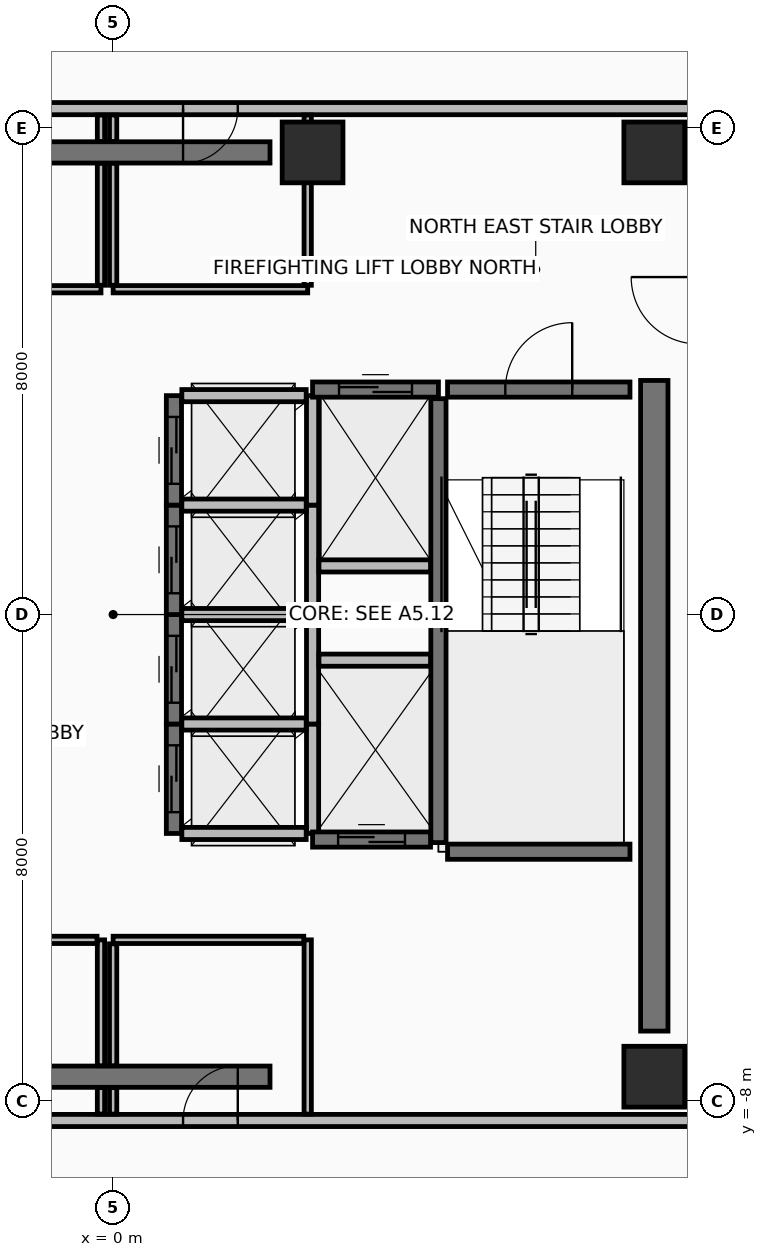
"""IFC4 building model, lengths in metres.
Left out: names, types, materials, properties, quantities, classifications, styles, units other than length and angle.
Written with IfcOpenShell. Run it as: python <this file> out.ifc"""

import sys

from ifc_helpers import new_model, si_unit, direction, frame, frame_2d, origin, origin_2d, place, context, subcontext, project, spatial, rectangle, extrude, element, fill, save


model = new_model("IFC4")
c1 = context("Model", 3, precision=1e-05, world=origin(), true_north=direction((0.0, 1.0)))
c2 = subcontext(c1, "Body", "Model", "MODEL_VIEW")
j1 = project(units=[si_unit("LENGTHUNIT", "METRE"), si_unit("PLANEANGLEUNIT", "RADIAN")], contexts=[c1])
p1 = place(None, origin())
s1 = spatial("IfcSite", under=j1, at=p1, CompositionType="ELEMENT")
p2 = place(p1, origin())
s2 = spatial("IfcBuilding", under=s1, at=p2, CompositionType="ELEMENT")
p3 = place(p2, frame((0.0, 0.0, 271.4)))
s3 = spatial("IfcBuildingStorey", under=s2, at=p3, CompositionType="ELEMENT", Elevation=271.4)
for number, where, z_axis, x_axis in (
    (1, (8.9, -7.6, 0.0), (0.0, 0.0, 1.0), (1.0, 0.0, 0.0)),
    (2, (8.9, 7.6, 0.0), (0.0, 0.0, 1.0), (1.0, 0.0, 0.0)),
    (3, (3.28, 7.6, 0.0), (0.0, 0.0, 1.0), (1.0, 0.0, 0.0)),
):
    element("IfcColumn", number, at=place(p3, frame(where, z_axis=z_axis, x_axis=x_axis)), inside=s3, PredefinedType="COLUMN", context=c2, shape_type="SweptSolid", body=[
        extrude(rectangle(XDim=1.0, YDim=1.0, at=origin_2d()), origin(), (0.0, 0.0, 1.0), 3.6),
    ])
for number, where, z_axis, x_axis in (
    (4, (-2.8, -7.6, 0.0), (0.0, 0.0, 1.0), (1.0, 0.0, 0.0)),
    (5, (-2.8, 7.6, 0.0), (0.0, 0.0, 1.0), (1.0, 0.0, 0.0)),
):
    element("IfcWall", number, at=place(p3, frame(where, z_axis=z_axis, x_axis=x_axis)), inside=s3, PredefinedType="SHEAR", context=c2, shape_type="SweptSolid", body=[
        extrude(rectangle(XDim=5.38, YDim=0.35, at=frame_2d((2.69, 0.0))), origin(), (0.0, 0.0, 1.0), 3.42),
    ])
p4 = place(p3, frame((8.9, -6.85, 0.0), z_axis=(0.0, 0.0, 1.0), x_axis=(0.0, 1.0, 0.0)))
e6 = element("IfcWall", 6, at=p4, inside=s3, PredefinedType="SHEAR", context=c2, shape_type="SweptSolid", body=[
    extrude(rectangle(XDim=10.7, YDim=0.45, at=frame_2d((5.35, 0.0))), origin(), (0.0, 0.0, 1.0), 3.42),
])
p5 = place(p3, frame((-9.62, -8.32, 0.0), z_axis=(0.0, 0.0, 1.0), x_axis=(1.0, 0.0, 0.0)))
e7 = element("IfcWall", 7, at=p5, inside=s3, PredefinedType="PARTITIONING", context=c2, shape_type="SweptSolid", body=[
    extrude(rectangle(XDim=19.24, YDim=0.2, at=frame_2d((9.62, 0.0))), origin(), (0.0, 0.0, 1.0), 2.915),
])
p6 = place(p5, frame((7.37, 0.0, 0.0)))
e8 = element("IfcOpeningElement", 8, at=p6, cuts=e7, PredefinedType="OPENING", context=c2, shape_type="SweptSolid", body=[
    extrude(rectangle(XDim=0.9, YDim=2.1, at=frame_2d((0.45, 1.05))), frame((0.0, 0.11, 0.0), z_axis=(0.0, -1.0, 0.0), x_axis=(1.0, 0.0, 0.0)), (0.0, 0.0, 1.0), 0.22),
])
p7 = place(p5, frame((10.77, 0.0, 0.0)))
e9 = element("IfcOpeningElement", 9, at=p7, cuts=e7, PredefinedType="OPENING", context=c2, shape_type="SweptSolid", body=[
    extrude(rectangle(XDim=0.9, YDim=2.1, at=frame_2d((0.45, 1.05))), frame((0.0, 0.11, 0.0), z_axis=(0.0, -1.0, 0.0), x_axis=(1.0, 0.0, 0.0)), (0.0, 0.0, 1.0), 0.22),
])
p8 = place(p3, frame((9.62, 8.32, 0.0), z_axis=(0.0, 0.0, 1.0), x_axis=(-1.0, 0.0, 0.0)))
e10 = element("IfcWall", 10, at=p8, inside=s3, PredefinedType="PARTITIONING", context=c2, shape_type="SweptSolid", body=[
    extrude(rectangle(XDim=19.24, YDim=0.2, at=frame_2d((9.62, 0.0))), origin(), (0.0, 0.0, 1.0), 2.915),
])
p9 = place(p8, frame((10.97, 0.0, 0.0)))
e11 = element("IfcOpeningElement", 11, at=p9, cuts=e10, PredefinedType="OPENING", context=c2, shape_type="SweptSolid", body=[
    extrude(rectangle(XDim=0.9, YDim=2.1, at=frame_2d((0.45, 1.05))), frame((0.0, 0.11, 0.0), z_axis=(0.0, -1.0, 0.0), x_axis=(1.0, 0.0, 0.0)), (0.0, 0.0, 1.0), 0.22),
])
p10 = place(p8, frame((7.57, 0.0, 0.0)))
e12 = element("IfcOpeningElement", 12, at=p10, cuts=e10, PredefinedType="OPENING", context=c2, shape_type="SweptSolid", body=[
    extrude(rectangle(XDim=0.9, YDim=2.1, at=frame_2d((0.45, 1.05))), frame((0.0, 0.11, 0.0), z_axis=(0.0, -1.0, 0.0), x_axis=(1.0, 0.0, 0.0)), (0.0, 0.0, 1.0), 0.22),
])
p11 = place(p8, frame((15.02, 0.0, 0.0)))
e13 = element("IfcOpeningElement", 13, at=p11, cuts=e10, PredefinedType="OPENING", context=c2, shape_type="SweptSolid", body=[
    extrude(rectangle(XDim=0.9, YDim=2.1, at=frame_2d((0.45, 1.05))), frame((0.0, 0.11, 0.0), z_axis=(0.0, -1.0, 0.0), x_axis=(1.0, 0.0, 0.0)), (0.0, 0.0, 1.0), 0.22),
])
p12 = place(p3, frame((5.35, -3.75, 0.0), z_axis=(0.0, 0.0, 1.0), x_axis=(0.0, 1.0, 0.0)))
e14 = element("IfcWall", 14, at=p12, inside=s3, PredefinedType="SHEAR", context=c2, shape_type="SweptSolid", body=[
    extrude(rectangle(XDim=7.3, YDim=0.25, at=frame_2d((3.65, 0.0))), origin(), (0.0, 0.0, 1.0), 3.42),
])
p13 = place(p3, frame((5.5, 3.7, 0.0), z_axis=(0.0, 0.0, 1.0), x_axis=(1.0, 0.0, 0.0)))
e15 = element("IfcWall", 15, at=p13, inside=s3, PredefinedType="SHEAR", context=c2, shape_type="SweptSolid", body=[
    extrude(rectangle(XDim=3.0, YDim=0.25, at=frame_2d((1.5, 0.0))), origin(), (0.0, 0.0, 1.0), 3.42),
])
p14 = place(p13, frame((0.95, 0.0, 0.0)))
e16 = element("IfcOpeningElement", 16, at=p14, cuts=e15, PredefinedType="OPENING", context=c2, shape_type="SweptSolid", body=[
    extrude(rectangle(XDim=1.1, YDim=2.15, at=frame_2d((0.55, 1.075))), frame((0.0, 0.135, 0.0), z_axis=(0.0, -1.0, 0.0), x_axis=(1.0, 0.0, 0.0)), (0.0, 0.0, 1.0), 0.27),
])
p15 = place(p3, frame((5.5, -3.9, 0.0), z_axis=(0.0, 0.0, 1.0), x_axis=(1.0, 0.0, 0.0)))
e17 = element("IfcWall", 17, at=p15, inside=s3, PredefinedType="SHEAR", context=c2, shape_type="SweptSolid", body=[
    extrude(rectangle(XDim=3.0, YDim=0.25, at=frame_2d((1.5, 0.0))), origin(), (0.0, 0.0, 1.0), 3.42),
])
p16 = place(p3, frame((1.0, -3.6, 0.0), z_axis=(0.0, 0.0, 1.0), x_axis=(0.0, 1.0, 0.0)))
e18 = element("IfcWall", 18, at=p16, inside=s3, PredefinedType="SHEAR", context=c2, shape_type="SweptSolid", body=[
    extrude(rectangle(XDim=1.8, YDim=0.25, at=frame_2d((0.9, 0.0))), origin(), (0.0, 0.0, 1.0), 3.42),
])
p17 = place(p16, frame((0.35, 0.0, 0.0)))
e19 = element("IfcOpeningElement", 19, at=p17, cuts=e18, PredefinedType="OPENING", context=c2, shape_type="SweptSolid", body=[
    extrude(rectangle(XDim=1.1, YDim=2.2, at=frame_2d((0.55, 1.1))), frame((0.0, 0.135, 0.0), z_axis=(0.0, -1.0, 0.0), x_axis=(1.0, 0.0, 0.0)), (0.0, 0.0, 1.0), 0.27),
])
p18 = place(p3, frame((3.28, -3.6, 0.0), z_axis=(0.0, 0.0, 1.0), x_axis=(0.0, 1.0, 0.0)))
e20 = element("IfcWall", 20, at=p18, inside=s3, PredefinedType="PARTITIONING", context=c2, shape_type="SweptSolid", body=[
    extrude(rectangle(XDim=1.8, YDim=0.2, at=frame_2d((0.9, 0.0))), origin(), (0.0, 0.0, 1.0), 3.42),
])
for number, where, z_axis, x_axis in (
    (21, (1.13, -3.6, 0.0), (0.0, 0.0, 1.0), (1.0, 0.0, 0.0)),
    (22, (1.13, -1.8, 0.0), (0.0, 0.0, 1.0), (1.0, 0.0, 0.0)),
):
    element("IfcWall", number, at=place(p3, frame(where, z_axis=z_axis, x_axis=x_axis)), inside=s3, PredefinedType="PARTITIONING", context=c2, shape_type="SweptSolid", body=[
        extrude(rectangle(XDim=2.045, YDim=0.2, at=frame_2d((1.022, 0.0))), origin(), (0.0, 0.0, 1.0), 3.42),
    ])
p19 = place(p3, frame((1.0, -1.8, 0.0), z_axis=(0.0, 0.0, 1.0), x_axis=(0.0, 1.0, 0.0)))
e23 = element("IfcWall", 23, at=p19, inside=s3, PredefinedType="SHEAR", context=c2, shape_type="SweptSolid", body=[
    extrude(rectangle(XDim=1.8, YDim=0.25, at=frame_2d((0.9, 0.0))), origin(), (0.0, 0.0, 1.0), 3.42),
])
p20 = place(p19, frame((0.35, 0.0, 0.0)))
e24 = element("IfcOpeningElement", 24, at=p20, cuts=e23, PredefinedType="OPENING", context=c2, shape_type="SweptSolid", body=[
    extrude(rectangle(XDim=1.1, YDim=2.2, at=frame_2d((0.55, 1.1))), frame((0.0, 0.135, 0.0), z_axis=(0.0, -1.0, 0.0), x_axis=(1.0, 0.0, 0.0)), (0.0, 0.0, 1.0), 0.27),
])
p21 = place(p3, frame((3.28, -1.8, 0.0), z_axis=(0.0, 0.0, 1.0), x_axis=(0.0, 1.0, 0.0)))
e25 = element("IfcWall", 25, at=p21, inside=s3, PredefinedType="PARTITIONING", context=c2, shape_type="SweptSolid", body=[
    extrude(rectangle(XDim=1.8, YDim=0.2, at=frame_2d((0.9, 0.0))), origin(), (0.0, 0.0, 1.0), 3.42),
])
p22 = place(p3, frame((1.13, 0.0, 0.0), z_axis=(0.0, 0.0, 1.0), x_axis=(1.0, 0.0, 0.0)))
e26 = element("IfcWall", 26, at=p22, inside=s3, PredefinedType="PARTITIONING", context=c2, shape_type="SweptSolid", body=[
    extrude(rectangle(XDim=2.045, YDim=0.2, at=frame_2d((1.022, 0.0))), origin(), (0.0, 0.0, 1.0), 3.42),
])
p23 = place(p3, frame((1.0, 0.0, 0.0), z_axis=(0.0, 0.0, 1.0), x_axis=(0.0, 1.0, 0.0)))
e27 = element("IfcWall", 27, at=p23, inside=s3, PredefinedType="SHEAR", context=c2, shape_type="SweptSolid", body=[
    extrude(rectangle(XDim=1.8, YDim=0.25, at=frame_2d((0.9, 0.0))), origin(), (0.0, 0.0, 1.0), 3.42),
])
p24 = place(p23, frame((0.35, 0.0, 0.0)))
e28 = element("IfcOpeningElement", 28, at=p24, cuts=e27, PredefinedType="OPENING", context=c2, shape_type="SweptSolid", body=[
    extrude(rectangle(XDim=1.1, YDim=2.2, at=frame_2d((0.55, 1.1))), frame((0.0, 0.135, 0.0), z_axis=(0.0, -1.0, 0.0), x_axis=(1.0, 0.0, 0.0)), (0.0, 0.0, 1.0), 0.27),
])
p25 = place(p3, frame((3.28, 0.0, 0.0), z_axis=(0.0, 0.0, 1.0), x_axis=(0.0, 1.0, 0.0)))
e29 = element("IfcWall", 29, at=p25, inside=s3, PredefinedType="PARTITIONING", context=c2, shape_type="SweptSolid", body=[
    extrude(rectangle(XDim=1.8, YDim=0.2, at=frame_2d((0.9, 0.0))), origin(), (0.0, 0.0, 1.0), 3.42),
])
p26 = place(p3, frame((1.13, 1.8, 0.0), z_axis=(0.0, 0.0, 1.0), x_axis=(1.0, 0.0, 0.0)))
e30 = element("IfcWall", 30, at=p26, inside=s3, PredefinedType="PARTITIONING", context=c2, shape_type="SweptSolid", body=[
    extrude(rectangle(XDim=2.045, YDim=0.2, at=frame_2d((1.022, 0.0))), origin(), (0.0, 0.0, 1.0), 3.42),
])
p27 = place(p3, frame((1.0, 1.8, 0.0), z_axis=(0.0, 0.0, 1.0), x_axis=(0.0, 1.0, 0.0)))
e31 = element("IfcWall", 31, at=p27, inside=s3, PredefinedType="SHEAR", context=c2, shape_type="SweptSolid", body=[
    extrude(rectangle(XDim=1.8, YDim=0.25, at=frame_2d((0.9, 0.0))), origin(), (0.0, 0.0, 1.0), 3.42),
])
p28 = place(p27, frame((0.35, 0.0, 0.0)))
e32 = element("IfcOpeningElement", 32, at=p28, cuts=e31, PredefinedType="OPENING", context=c2, shape_type="SweptSolid", body=[
    extrude(rectangle(XDim=1.1, YDim=2.2, at=frame_2d((0.55, 1.1))), frame((0.0, 0.135, 0.0), z_axis=(0.0, -1.0, 0.0), x_axis=(1.0, 0.0, 0.0)), (0.0, 0.0, 1.0), 0.27),
])
p29 = place(p3, frame((3.28, 1.8, 0.0), z_axis=(0.0, 0.0, 1.0), x_axis=(0.0, 1.0, 0.0)))
e33 = element("IfcWall", 33, at=p29, inside=s3, PredefinedType="PARTITIONING", context=c2, shape_type="SweptSolid", body=[
    extrude(rectangle(XDim=1.8, YDim=0.2, at=frame_2d((0.9, 0.0))), origin(), (0.0, 0.0, 1.0), 3.42),
])
p30 = place(p3, frame((1.13, 3.6, 0.0), z_axis=(0.0, 0.0, 1.0), x_axis=(1.0, 0.0, 0.0)))
e34 = element("IfcWall", 34, at=p30, inside=s3, PredefinedType="PARTITIONING", context=c2, shape_type="SweptSolid", body=[
    extrude(rectangle(XDim=2.045, YDim=0.2, at=frame_2d((1.022, 0.0))), origin(), (0.0, 0.0, 1.0), 2.715),
])
p31 = place(p3, frame((3.28, 3.7, 0.0), z_axis=(0.0, 0.0, 1.0), x_axis=(1.0, 0.0, 0.0)))
e35 = element("IfcWall", 35, at=p31, inside=s3, PredefinedType="SHEAR", context=c2, shape_type="SweptSolid", body=[
    extrude(rectangle(XDim=2.07, YDim=0.25, at=frame_2d((1.035, 0.0))), origin(), (0.0, 0.0, 1.0), 3.42),
])
p32 = place(p31, frame((0.435, 0.0, 0.0)))
e36 = element("IfcOpeningElement", 36, at=p32, cuts=e35, PredefinedType="OPENING", context=c2, shape_type="SweptSolid", body=[
    extrude(rectangle(XDim=1.2, YDim=2.2, at=frame_2d((0.6, 1.1))), frame((0.0, 0.135, 0.0), z_axis=(0.0, -1.0, 0.0), x_axis=(1.0, 0.0, 0.0)), (0.0, 0.0, 1.0), 0.27),
])
p33 = place(p3, frame((3.385, 0.8, 0.0), z_axis=(0.0, 0.0, 1.0), x_axis=(1.0, 0.0, 0.0)))
e37 = element("IfcWall", 37, at=p33, inside=s3, PredefinedType="PARTITIONING", context=c2, shape_type="SweptSolid", body=[
    extrude(rectangle(XDim=1.835, YDim=0.2, at=frame_2d((0.917, 0.0))), origin(), (0.0, 0.0, 1.0), 3.42),
])
p34 = place(p3, frame((3.28, -3.7, 0.0), z_axis=(0.0, 0.0, 1.0), x_axis=(1.0, 0.0, 0.0)))
e38 = element("IfcWall", 38, at=p34, inside=s3, PredefinedType="SHEAR", context=c2, shape_type="SweptSolid", body=[
    extrude(rectangle(XDim=1.94, YDim=0.25, at=frame_2d((0.97, 0.0))), origin(), (0.0, 0.0, 1.0), 3.42),
])
p35 = place(p34, frame((0.42, 0.0, 0.0)))
e39 = element("IfcOpeningElement", 39, at=p35, cuts=e38, PredefinedType="OPENING", context=c2, shape_type="SweptSolid", body=[
    extrude(rectangle(XDim=1.1, YDim=2.2, at=frame_2d((0.55, 1.1))), frame((0.0, 0.135, 0.0), z_axis=(0.0, -1.0, 0.0), x_axis=(1.0, 0.0, 0.0)), (0.0, 0.0, 1.0), 0.27),
])
p36 = place(p3, frame((3.385, -0.75, 0.0), z_axis=(0.0, 0.0, 1.0), x_axis=(1.0, 0.0, 0.0)))
e40 = element("IfcWall", 40, at=p36, inside=s3, PredefinedType="PARTITIONING", context=c2, shape_type="SweptSolid", body=[
    extrude(rectangle(XDim=1.835, YDim=0.2, at=frame_2d((0.917, 0.0))), origin(), (0.0, 0.0, 1.0), 3.42),
])
p37 = place(p3, frame((-0.2, -8.215, 0.0), z_axis=(0.0, 0.0, 1.0), x_axis=(0.0, 1.0, 0.0)))
e41 = element("IfcWall", 41, at=p37, inside=s3, PredefinedType="PARTITIONING", context=c2, shape_type="SweptSolid", body=[
    extrude(rectangle(XDim=0.435, YDim=0.12, at=frame_2d((0.218, 0.0))), origin(), (0.0, 0.0, 1.0), 2.715),
])
p38 = place(p3, frame((-0.2, -7.42, 0.0), z_axis=(0.0, 0.0, 1.0), x_axis=(0.0, 1.0, 0.0)))
e42 = element("IfcWall", 42, at=p38, inside=s3, PredefinedType="PARTITIONING", context=c2, shape_type="SweptSolid", body=[
    extrude(rectangle(XDim=2.07, YDim=0.12, at=frame_2d((1.035, 0.0))), origin(), (0.0, 0.0, 1.0), 2.715),
])
p39 = place(p3, frame((-0.265, -5.35, 0.0), z_axis=(0.0, 0.0, 1.0), x_axis=(-1.0, 0.0, 0.0)))
e43 = element("IfcWall", 43, at=p39, inside=s3, PredefinedType="PARTITIONING", context=c2, shape_type="SweptSolid", body=[
    extrude(rectangle(XDim=3.135, YDim=0.12, at=frame_2d((1.567, 0.0))), origin(), (0.0, 0.0, 1.0), 2.715),
])
p40 = place(p3, frame((3.2, -8.215, 0.0), z_axis=(0.0, 0.0, 1.0), x_axis=(0.0, 1.0, 0.0)))
e44 = element("IfcWall", 44, at=p40, inside=s3, PredefinedType="PARTITIONING", context=c2, shape_type="SweptSolid", body=[
    extrude(rectangle(XDim=2.865, YDim=0.12, at=frame_2d((1.433, 0.0))), origin(), (0.0, 0.0, 1.0), 2.715),
])
p41 = place(p3, frame((3.135, -5.35, 0.0), z_axis=(0.0, 0.0, 1.0), x_axis=(-1.0, 0.0, 0.0)))
e45 = element("IfcWall", 45, at=p41, inside=s3, PredefinedType="PARTITIONING", context=c2, shape_type="SweptSolid", body=[
    extrude(rectangle(XDim=3.135, YDim=0.12, at=frame_2d((1.567, 0.0))), origin(), (0.0, 0.0, 1.0), 3.42),
])
p42 = place(p3, frame((0.0, -5.415, 0.0), z_axis=(0.0, 0.0, 1.0), x_axis=(0.0, -1.0, 0.0)))
e46 = element("IfcWall", 46, at=p42, inside=s3, PredefinedType="PARTITIONING", context=c2, shape_type="SweptSolid", body=[
    extrude(rectangle(XDim=2.005, YDim=0.12, at=frame_2d((1.002, 0.0))), origin(), (0.0, 0.0, 1.0), 2.715),
])
p43 = place(p3, frame((0.0, -7.78, 0.0), z_axis=(0.0, 0.0, 1.0), x_axis=(0.0, -1.0, 0.0)))
e47 = element("IfcWall", 47, at=p43, inside=s3, PredefinedType="PARTITIONING", context=c2, shape_type="SweptSolid", body=[
    extrude(rectangle(XDim=0.435, YDim=0.12, at=frame_2d((0.218, 0.0))), origin(), (0.0, 0.0, 1.0), 2.715),
])
p44 = place(p3, frame((-3.4, 5.35, 0.0), z_axis=(0.0, 0.0, 1.0), x_axis=(1.0, 0.0, 0.0)))
e48 = element("IfcWall", 48, at=p44, inside=s3, PredefinedType="PARTITIONING", context=c2, shape_type="SweptSolid", body=[
    extrude(rectangle(XDim=3.2, YDim=0.12, at=frame_2d((1.6, 0.0))), origin(), (0.0, 0.0, 1.0), 3.42),
])
p45 = place(p3, frame((-0.2, 5.415, 0.0), z_axis=(0.0, 0.0, 1.0), x_axis=(0.0, 1.0, 0.0)))
e49 = element("IfcWall", 49, at=p45, inside=s3, PredefinedType="PARTITIONING", context=c2, shape_type="SweptSolid", body=[
    extrude(rectangle(XDim=2.005, YDim=0.12, at=frame_2d((1.002, 0.0))), origin(), (0.0, 0.0, 1.0), 2.715),
])
p46 = place(p3, frame((-0.2, 7.78, 0.0), z_axis=(0.0, 0.0, 1.0), x_axis=(0.0, 1.0, 0.0)))
e50 = element("IfcWall", 50, at=p46, inside=s3, PredefinedType="PARTITIONING", context=c2, shape_type="SweptSolid", body=[
    extrude(rectangle(XDim=0.435, YDim=0.12, at=frame_2d((0.218, 0.0))), origin(), (0.0, 0.0, 1.0), 2.715),
])
p47 = place(p3, frame((0.0, 5.35, 0.0), z_axis=(0.0, 0.0, 1.0), x_axis=(1.0, 0.0, 0.0)))
e51 = element("IfcWall", 51, at=p47, inside=s3, PredefinedType="PARTITIONING", context=c2, shape_type="SweptSolid", body=[
    extrude(rectangle(XDim=3.2, YDim=0.12, at=frame_2d((1.6, 0.0))), origin(), (0.0, 0.0, 1.0), 2.715),
])
p48 = place(p3, frame((3.2, 5.415, 0.0), z_axis=(0.0, 0.0, 1.0), x_axis=(0.0, 1.0, 0.0)))
e52 = element("IfcWall", 52, at=p48, inside=s3, PredefinedType="PARTITIONING", context=c2, shape_type="SweptSolid", body=[
    extrude(rectangle(XDim=2.8, YDim=0.12, at=frame_2d((1.4, 0.0))), origin(), (0.0, 0.0, 1.0), 2.715),
])
p49 = place(p3, frame((0.0, 8.215, 0.0), z_axis=(0.0, 0.0, 1.0), x_axis=(0.0, -1.0, 0.0)))
e53 = element("IfcWall", 53, at=p49, inside=s3, PredefinedType="PARTITIONING", context=c2, shape_type="SweptSolid", body=[
    extrude(rectangle(XDim=0.435, YDim=0.12, at=frame_2d((0.218, 0.0))), origin(), (0.0, 0.0, 1.0), 2.715),
])
p50 = place(p3, frame((0.0, 7.42, 0.0), z_axis=(0.0, 0.0, 1.0), x_axis=(0.0, -1.0, 0.0)))
e54 = element("IfcWall", 54, at=p50, inside=s3, PredefinedType="PARTITIONING", context=c2, shape_type="SweptSolid", body=[
    extrude(rectangle(XDim=2.005, YDim=0.12, at=frame_2d((1.002, 0.0))), origin(), (0.0, 0.0, 1.0), 2.715),
])
p51 = place(p14, frame((1.1, 0.0, 0.0), z_axis=(0.0, 0.0, 1.0), x_axis=(-1.0, 0.0, 0.0)))
e55 = element("IfcDoor", 55, at=p51, inside=s3, OperationType="SINGLE_SWING_LEFT", PredefinedType="DOOR", context=c2, shape_type="SweptSolid", body=[
    extrude(rectangle(XDim=1.1, YDim=2.15, at=frame_2d((0.55, 1.075))), frame((0.0, 0.025, 0.0), z_axis=(0.0, -1.0, 0.0), x_axis=(1.0, 0.0, 0.0)), (0.0, 0.0, 1.0), 0.05),
])
fill(e16, e55)
p52 = place(p17, origin())
e56 = element("IfcDoor", 56, at=p52, inside=s3, OperationType="SLIDING_TO_LEFT", PredefinedType="DOOR", context=c2, shape_type="SweptSolid", body=[
    extrude(rectangle(XDim=1.1, YDim=2.2, at=frame_2d((0.55, 1.1))), frame((0.0, 0.025, 0.0), z_axis=(0.0, -1.0, 0.0), x_axis=(1.0, 0.0, 0.0)), (0.0, 0.0, 1.0), 0.05),
])
fill(e19, e56)
p53 = place(p20, origin())
e57 = element("IfcDoor", 57, at=p53, inside=s3, OperationType="SLIDING_TO_LEFT", PredefinedType="DOOR", context=c2, shape_type="SweptSolid", body=[
    extrude(rectangle(XDim=1.1, YDim=2.2, at=frame_2d((0.55, 1.1))), frame((0.0, 0.025, 0.0), z_axis=(0.0, -1.0, 0.0), x_axis=(1.0, 0.0, 0.0)), (0.0, 0.0, 1.0), 0.05),
])
fill(e24, e57)
p54 = place(p24, origin())
e58 = element("IfcDoor", 58, at=p54, inside=s3, OperationType="SLIDING_TO_LEFT", PredefinedType="DOOR", context=c2, shape_type="SweptSolid", body=[
    extrude(rectangle(XDim=1.1, YDim=2.2, at=frame_2d((0.55, 1.1))), frame((0.0, 0.025, 0.0), z_axis=(0.0, -1.0, 0.0), x_axis=(1.0, 0.0, 0.0)), (0.0, 0.0, 1.0), 0.05),
])
fill(e28, e58)
p55 = place(p28, origin())
e59 = element("IfcDoor", 59, at=p55, inside=s3, OperationType="SLIDING_TO_LEFT", PredefinedType="DOOR", context=c2, shape_type="SweptSolid", body=[
    extrude(rectangle(XDim=1.1, YDim=2.2, at=frame_2d((0.55, 1.1))), frame((0.0, 0.025, 0.0), z_axis=(0.0, -1.0, 0.0), x_axis=(1.0, 0.0, 0.0)), (0.0, 0.0, 1.0), 0.05),
])
fill(e32, e59)
p56 = place(p32, origin())
e60 = element("IfcDoor", 60, at=p56, inside=s3, OperationType="SLIDING_TO_RIGHT", PredefinedType="DOOR", context=c2, shape_type="SweptSolid", body=[
    extrude(rectangle(XDim=1.2, YDim=2.2, at=frame_2d((0.6, 1.1))), frame((0.0, 0.025, 0.0), z_axis=(0.0, -1.0, 0.0), x_axis=(1.0, 0.0, 0.0)), (0.0, 0.0, 1.0), 0.05),
])
fill(e36, e60)
p57 = place(p35, origin())
e61 = element("IfcDoor", 61, at=p57, inside=s3, OperationType="SLIDING_TO_LEFT", PredefinedType="DOOR", context=c2, shape_type="SweptSolid", body=[
    extrude(rectangle(XDim=1.1, YDim=2.2, at=frame_2d((0.55, 1.1))), frame((0.0, 0.025, 0.0), z_axis=(0.0, -1.0, 0.0), x_axis=(1.0, 0.0, 0.0)), (0.0, 0.0, 1.0), 0.05),
])
fill(e39, e61)
p58 = place(p7, frame((0.9, 0.0, 0.0), z_axis=(0.0, 0.0, 1.0), x_axis=(-1.0, 0.0, 0.0)))
e62 = element("IfcDoor", 62, at=p58, inside=s3, OperationType="SINGLE_SWING_LEFT", PredefinedType="DOOR", context=c2, shape_type="SweptSolid", body=[
    extrude(rectangle(XDim=0.9, YDim=2.1, at=frame_2d((0.45, 1.05))), frame((0.0, 0.025, 0.0), z_axis=(0.0, -1.0, 0.0), x_axis=(1.0, 0.0, 0.0)), (0.0, 0.0, 1.0), 0.05),
])
fill(e9, e62)
p59 = place(p10, frame((0.9, 0.0, 0.0), z_axis=(0.0, 0.0, 1.0), x_axis=(-1.0, 0.0, 0.0)))
e63 = element("IfcDoor", 63, at=p59, inside=s3, OperationType="SINGLE_SWING_LEFT", PredefinedType="DOOR", context=c2, shape_type="SweptSolid", body=[
    extrude(rectangle(XDim=0.9, YDim=2.1, at=frame_2d((0.45, 1.05))), frame((0.0, 0.025, 0.0), z_axis=(0.0, -1.0, 0.0), x_axis=(1.0, 0.0, 0.0)), (0.0, 0.0, 1.0), 0.05),
])
fill(e12, e63)
save(model, sys.argv[1])
